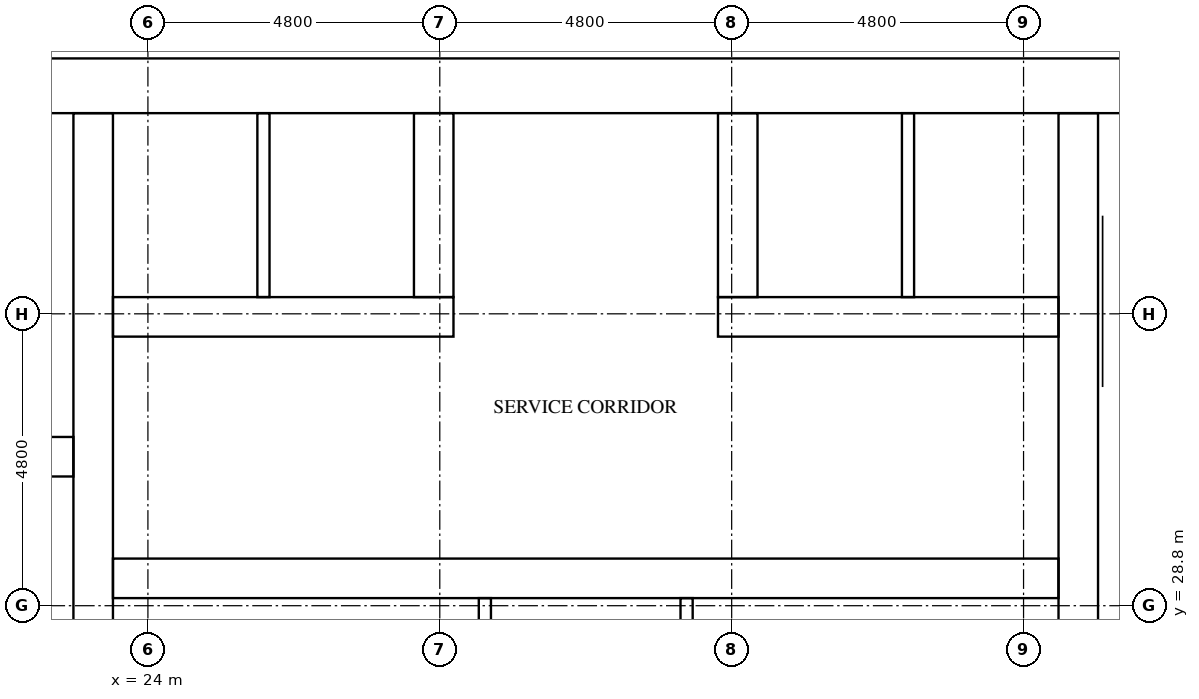
"""IFC4 building model, lengths in metres.
Left out: names, types, materials, properties, quantities, classifications, styles, units other than length and angle.
Written with IfcOpenShell. Run it as: python <this file> out.ifc"""

import sys

from ifc_helpers import new_model, si_unit, direction, frame, frame_2d, origin, place, context, subcontext, project, spatial, rectangle, extrude, element, fill, save


model = new_model("IFC4")
c1 = context("Model", 3, precision=1e-05, world=origin(), true_north=direction((0.0, 1.0)))
c2 = subcontext(c1, "Body", "Model", "MODEL_VIEW")
j1 = project(units=[si_unit("LENGTHUNIT", "METRE"), si_unit("PLANEANGLEUNIT", "RADIAN")], contexts=[c1])
p1 = place(None, origin())
s1 = spatial("IfcSite", under=j1, at=p1, CompositionType="ELEMENT")
p2 = place(p1, origin())
s2 = spatial("IfcBuilding", under=s1, at=p2, CompositionType="ELEMENT")
p3 = place(p2, frame((0.0, 0.0, 76.8)))
s3 = spatial("IfcBuildingStorey", under=s2, at=p3, CompositionType="ELEMENT", Elevation=76.8)
p4 = place(p3, frame((15.0, 37.35, 0.0), z_axis=(0.0, 0.0, 1.0), x_axis=(1.0, 0.0, 0.0)))
e1 = element("IfcWall", 1, at=p4, inside=s3, PredefinedType="SHEAR", context=c2, shape_type="SweptSolid", body=[
    extrude(rectangle(XDim=32.4, YDim=0.9, at=frame_2d((16.2, 0.0))), origin(), (0.0, 0.0, 1.0), 3.2),
])
p5 = place(p4, frame((15.3, 0.0, 0.0)))
e2 = element("IfcOpeningElement", 2, at=p5, cuts=e1, PredefinedType="OPENING", context=c2, shape_type="SweptSolid", body=[
    extrude(rectangle(XDim=1.8, YDim=2.1, at=frame_2d((0.9, 1.05))), frame((0.0, 0.46, 0.0), z_axis=(0.0, -1.0, 0.0), x_axis=(1.0, 0.0, 0.0)), (0.0, 0.0, 1.0), 0.92),
])
p6 = place(p4, frame((1.794, 0.0, 0.0)))
e3 = element("IfcOpeningElement", 3, at=p6, cuts=e1, PredefinedType="OPENING", context=c2, shape_type="SweptSolid", body=[
    extrude(rectangle(XDim=1.0, YDim=2.1, at=frame_2d((0.5, 1.05))), frame((0.0, 0.46, 0.0), z_axis=(0.0, -1.0, 0.0), x_axis=(1.0, 0.0, 0.0)), (0.0, 0.0, 1.0), 0.92),
])
p7 = place(p4, frame((5.331, 0.0, 0.0)))
e4 = element("IfcOpeningElement", 4, at=p7, cuts=e1, PredefinedType="OPENING", context=c2, shape_type="SweptSolid", body=[
    extrude(rectangle(XDim=1.0, YDim=2.1, at=frame_2d((0.5, 1.05))), frame((0.0, 0.46, 0.0), z_axis=(0.0, -1.0, 0.0), x_axis=(1.0, 0.0, 0.0)), (0.0, 0.0, 1.0), 0.92),
])
p8 = place(p3, frame((23.1, 15.9, 0.0), z_axis=(0.0, 0.0, 1.0), x_axis=(0.0, 1.0, 0.0)))
e5 = element("IfcWall", 5, at=p8, inside=s3, PredefinedType="SHEAR", context=c2, shape_type="SweptSolid", body=[
    extrude(rectangle(XDim=21.0, YDim=0.65, at=frame_2d((10.5, 0.0))), origin(), (0.0, 0.0, 1.0), 3.2),
])
p9 = place(p3, frame((39.3, 27.75, 0.0), z_axis=(0.0, 0.0, 1.0), x_axis=(0.0, 1.0, 0.0)))
e6 = element("IfcWall", 6, at=p9, inside=s3, PredefinedType="SHEAR", context=c2, shape_type="SweptSolid", body=[
    extrude(rectangle(XDim=9.15, YDim=0.65, at=frame_2d((4.575, 0.0))), origin(), (0.0, 0.0, 1.0), 3.2),
])
p10 = place(p3, frame((15.9, 31.25, 0.0), z_axis=(0.0, 0.0, 1.0), x_axis=(1.0, 0.0, 0.0)))
e7 = element("IfcWall", 7, at=p10, inside=s3, PredefinedType="SHEAR", context=c2, shape_type="SweptSolid", body=[
    extrude(rectangle(XDim=6.875, YDim=0.65, at=frame_2d((3.438, 0.0))), origin(), (0.0, 0.0, 1.0), 3.2),
])
p11 = place(p3, frame((23.425, 29.25, 0.0), z_axis=(0.0, 0.0, 1.0), x_axis=(1.0, 0.0, 0.0)))
e8 = element("IfcWall", 8, at=p11, inside=s3, PredefinedType="SHEAR", context=c2, shape_type="SweptSolid", body=[
    extrude(rectangle(XDim=15.55, YDim=0.65, at=frame_2d((7.775, 0.0))), origin(), (0.0, 0.0, 1.0), 3.2),
])
p12 = place(p11, frame((2.508, 0.0, 0.0)))
e9 = element("IfcOpeningElement", 9, at=p12, cuts=e8, PredefinedType="OPENING", context=c2, shape_type="SweptSolid", body=[
    extrude(rectangle(XDim=1.0, YDim=2.1, at=frame_2d((0.5, 1.05))), frame((0.0, 0.335, 0.0), z_axis=(0.0, -1.0, 0.0), x_axis=(1.0, 0.0, 0.0)), (0.0, 0.0, 1.0), 0.67),
])
p13 = place(p11, frame((7.275, 0.0, 0.0)))
e10 = element("IfcOpeningElement", 10, at=p13, cuts=e8, PredefinedType="OPENING", context=c2, shape_type="SweptSolid", body=[
    extrude(rectangle(XDim=1.0, YDim=2.1, at=frame_2d((0.5, 1.05))), frame((0.0, 0.335, 0.0), z_axis=(0.0, -1.0, 0.0), x_axis=(1.0, 0.0, 0.0)), (0.0, 0.0, 1.0), 0.67),
])
p14 = place(p11, frame((12.042, 0.0, 0.0)))
e11 = element("IfcOpeningElement", 11, at=p14, cuts=e8, PredefinedType="OPENING", context=c2, shape_type="SweptSolid", body=[
    extrude(rectangle(XDim=1.0, YDim=2.1, at=frame_2d((0.5, 1.05))), frame((0.0, 0.335, 0.0), z_axis=(0.0, -1.0, 0.0), x_axis=(1.0, 0.0, 0.0)), (0.0, 0.0, 1.0), 0.67),
])
p15 = place(p3, frame((23.425, 33.55, 0.0), z_axis=(0.0, 0.0, 1.0), x_axis=(1.0, 0.0, 0.0)))
e12 = element("IfcWall", 12, at=p15, inside=s3, PredefinedType="SHEAR", context=c2, shape_type="SweptSolid", body=[
    extrude(rectangle(XDim=5.6, YDim=0.65, at=frame_2d((2.8, 0.0))), origin(), (0.0, 0.0, 1.0), 3.2),
])
p16 = place(p3, frame((33.375, 33.55, 0.0), z_axis=(0.0, 0.0, 1.0), x_axis=(1.0, 0.0, 0.0)))
e13 = element("IfcWall", 13, at=p16, inside=s3, PredefinedType="SHEAR", context=c2, shape_type="SweptSolid", body=[
    extrude(rectangle(XDim=5.6, YDim=0.65, at=frame_2d((2.8, 0.0))), origin(), (0.0, 0.0, 1.0), 3.2),
])
for number, where, z_axis, x_axis in (
    (14, (28.7, 33.875, 0.0), (0.0, 0.0, 1.0), (0.0, 1.0, 0.0)),
    (15, (33.7, 33.875, 0.0), (0.0, 0.0, 1.0), (0.0, 1.0, 0.0)),
):
    element("IfcWall", number, at=place(p3, frame(where, z_axis=z_axis, x_axis=x_axis)), inside=s3, PredefinedType="SHEAR", context=c2, shape_type="SweptSolid", body=[
        extrude(rectangle(XDim=3.025, YDim=0.65, at=frame_2d((1.512, 0.0))), origin(), (0.0, 0.0, 1.0), 3.2),
    ])
for number, where, z_axis, x_axis in (
    (16, (25.9, 33.875, 0.0), (0.0, 0.0, 1.0), (0.0, 1.0, 0.0)),
    (17, (36.5, 33.875, 0.0), (0.0, 0.0, 1.0), (0.0, 1.0, 0.0)),
):
    element("IfcWall", number, at=place(p3, frame(where, z_axis=z_axis, x_axis=x_axis)), inside=s3, PredefinedType="SOLIDWALL", context=c2, shape_type="SweptSolid", body=[
        extrude(rectangle(XDim=3.025, YDim=0.2, at=frame_2d((1.512, 0.0))), origin(), (0.0, 0.0, 1.0), 3.2),
    ])
for number, where, z_axis, x_axis in (
    (18, (29.541, 26.475, 0.0), (0.0, 0.0, 1.0), (0.0, 1.0, 0.0)),
    (19, (32.859, 26.475, 0.0), (0.0, 0.0, 1.0), (0.0, 1.0, 0.0)),
):
    element("IfcWall", number, at=place(p3, frame(where, z_axis=z_axis, x_axis=x_axis)), inside=s3, PredefinedType="PARTITIONING", context=c2, shape_type="SweptSolid", body=[
        extrude(rectangle(XDim=2.45, YDim=0.2, at=frame_2d((1.225, 0.0))), origin(), (0.0, 0.0, 1.0), 3.2),
    ])
p17 = place(p5, origin())
e20 = element("IfcDoor", 20, at=p17, inside=s3, OperationType="DOUBLE_DOOR_SINGLE_SWING", PredefinedType="DOOR", context=c2, shape_type="SweptSolid", body=[
    extrude(rectangle(XDim=1.8, YDim=2.1, at=frame_2d((0.9, 1.05))), frame((0.0, 0.025, 0.0), z_axis=(0.0, -1.0, 0.0), x_axis=(1.0, 0.0, 0.0)), (0.0, 0.0, 1.0), 0.05),
])
fill(e2, e20)
p18 = place(p12, origin())
e21 = element("IfcDoor", 21, at=p18, inside=s3, OperationType="SINGLE_SWING_RIGHT", PredefinedType="DOOR", context=c2, shape_type="SweptSolid", body=[
    extrude(rectangle(XDim=1.0, YDim=2.1, at=frame_2d((0.5, 1.05))), frame((0.0, 0.025, 0.0), z_axis=(0.0, -1.0, 0.0), x_axis=(1.0, 0.0, 0.0)), (0.0, 0.0, 1.0), 0.05),
])
fill(e9, e21)
p19 = place(p13, origin())
e22 = element("IfcDoor", 22, at=p19, inside=s3, OperationType="SINGLE_SWING_LEFT", PredefinedType="DOOR", context=c2, shape_type="SweptSolid", body=[
    extrude(rectangle(XDim=1.0, YDim=2.1, at=frame_2d((0.5, 1.05))), frame((0.0, 0.025, 0.0), z_axis=(0.0, -1.0, 0.0), x_axis=(1.0, 0.0, 0.0)), (0.0, 0.0, 1.0), 0.05),
])
fill(e10, e22)
p20 = place(p14, origin())
e23 = element("IfcDoor", 23, at=p20, inside=s3, OperationType="SINGLE_SWING_RIGHT", PredefinedType="DOOR", context=c2, shape_type="SweptSolid", body=[
    extrude(rectangle(XDim=1.0, YDim=2.1, at=frame_2d((0.5, 1.05))), frame((0.0, 0.025, 0.0), z_axis=(0.0, -1.0, 0.0), x_axis=(1.0, 0.0, 0.0)), (0.0, 0.0, 1.0), 0.05),
])
fill(e11, e23)
save(model, sys.argv[1])
